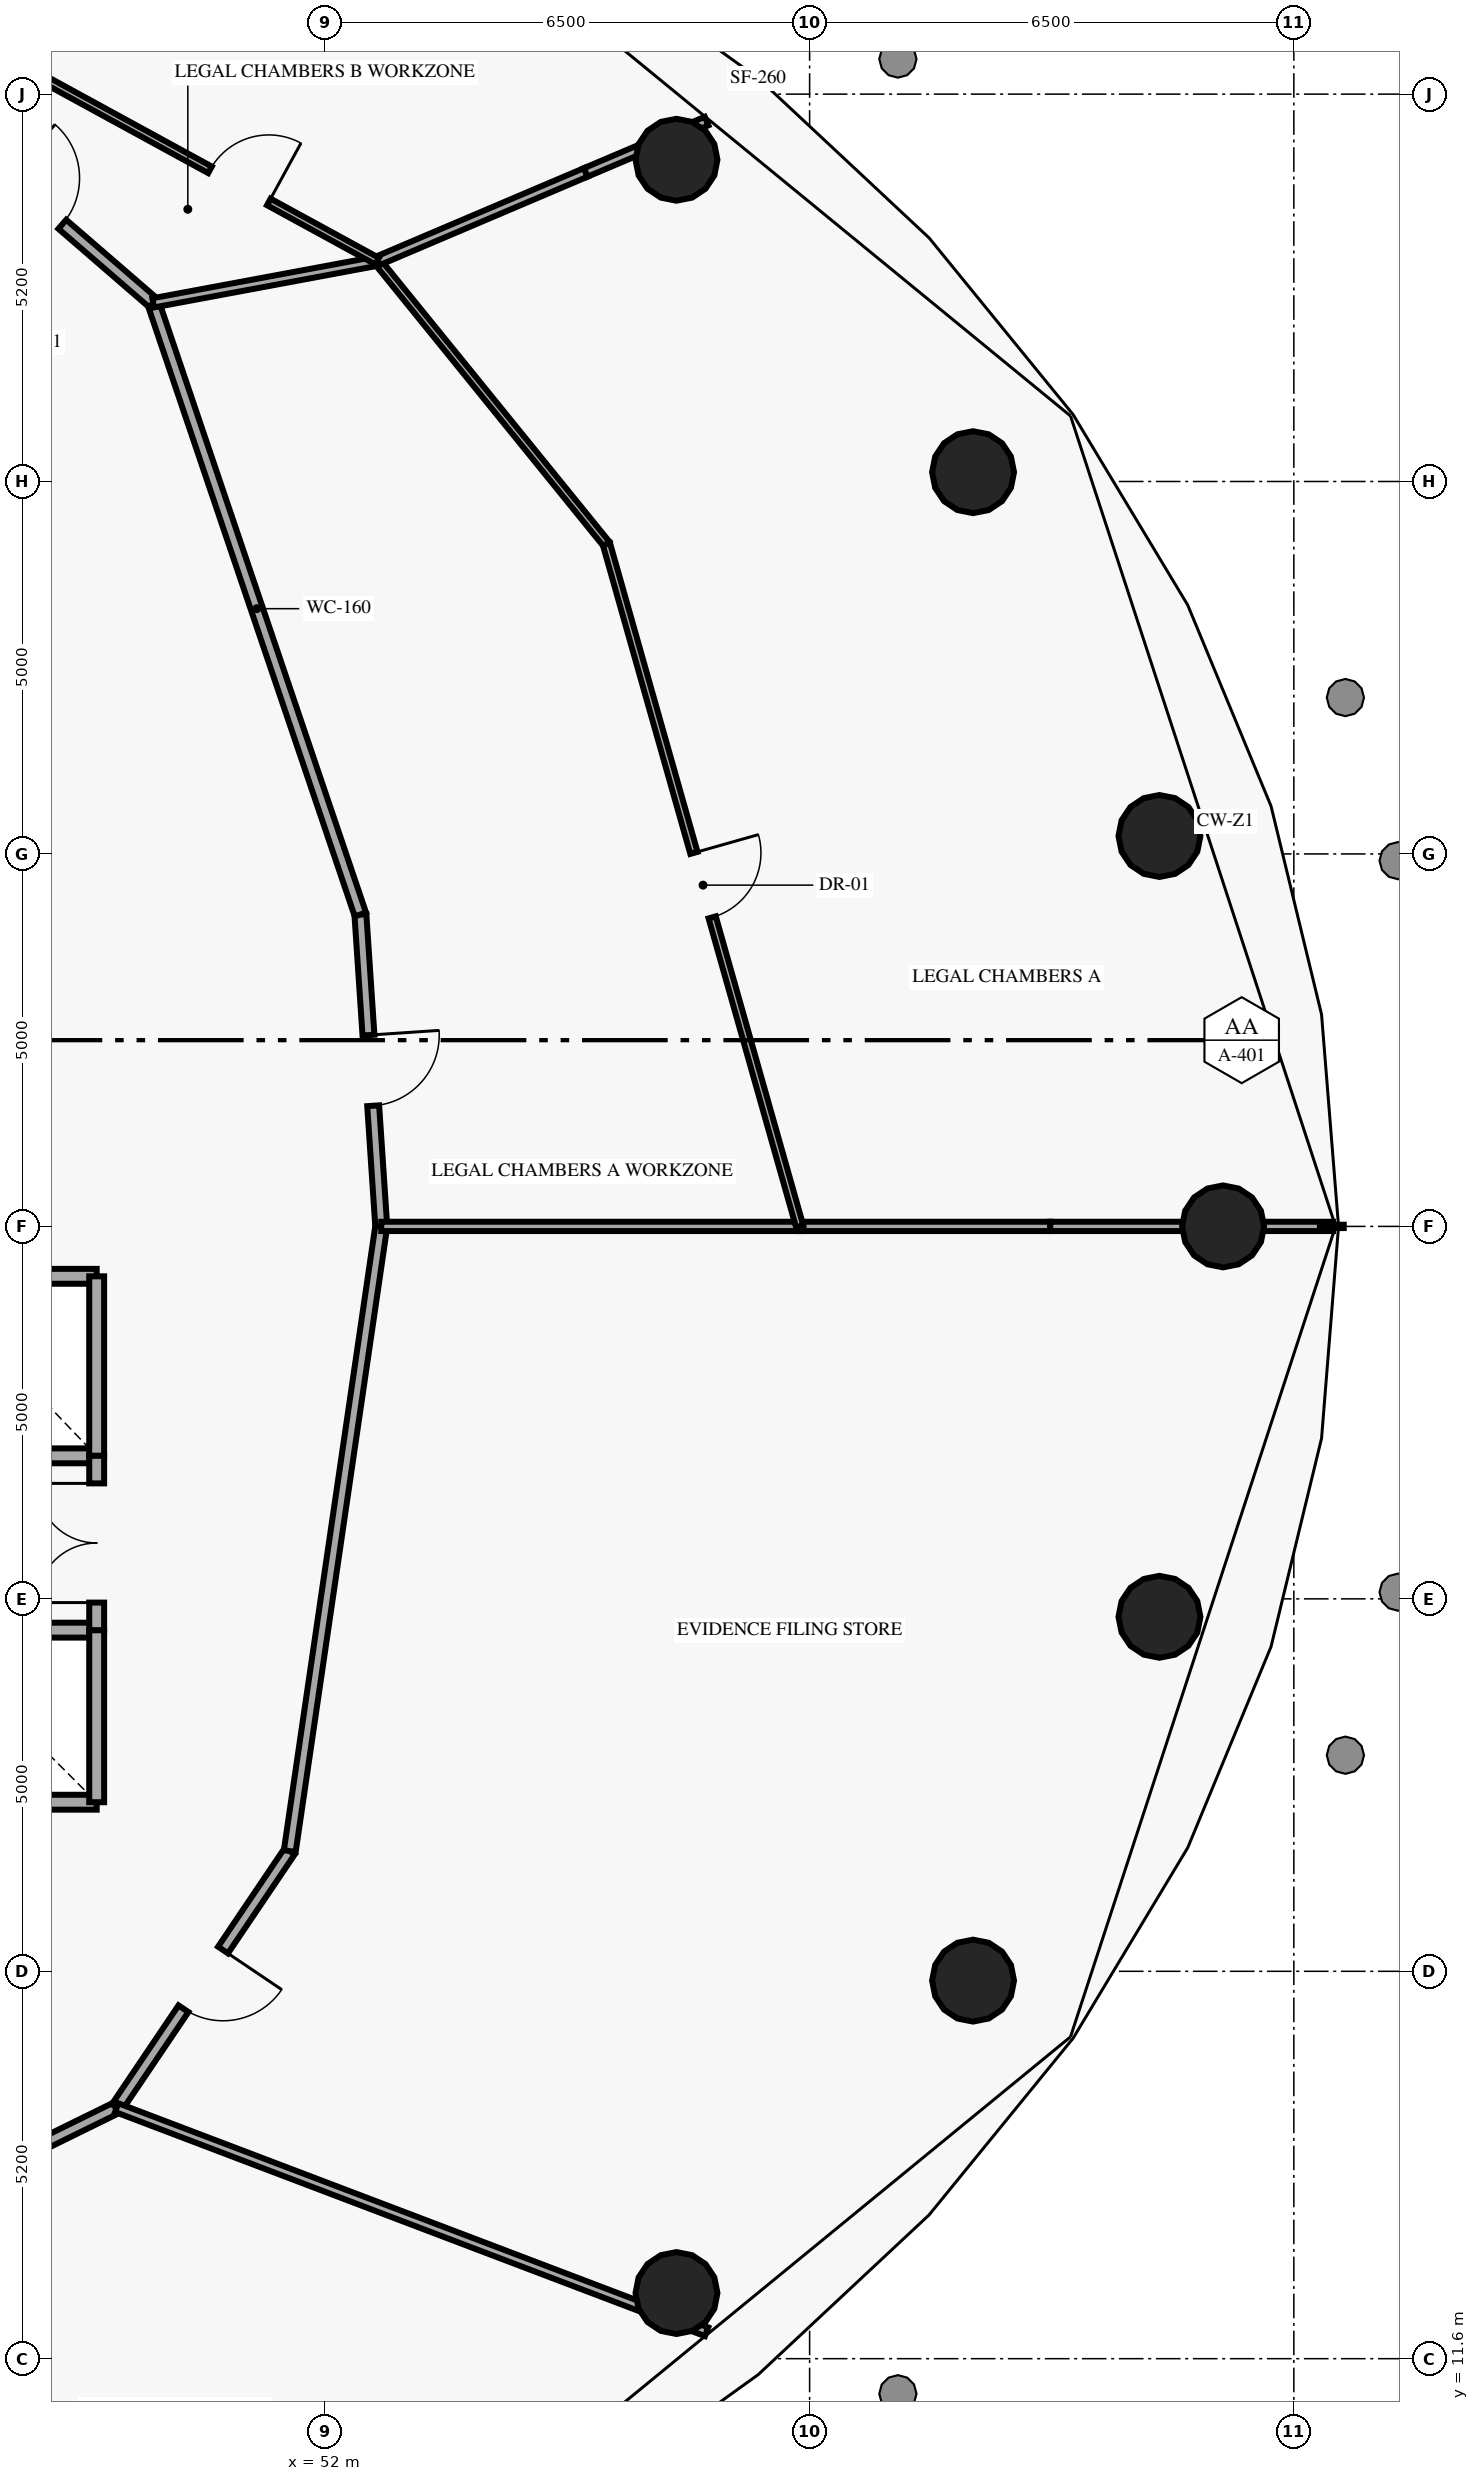
"""IFC4 building model, lengths in metres.
Left out: names, types, materials, properties, quantities, classifications, styles, units other than length and angle.
Written with IfcOpenShell. Run it as: python <this file> out.ifc"""

import sys

from ifc_helpers import new_model, si_unit, direction, frame, frame_2d, origin, origin_2d, place, context, subcontext, project, spatial, rectangle, circle, extrude, element, fill, save


model = new_model("IFC4")
c1 = context("Model", 3, precision=1e-05, world=origin(), true_north=direction((0.0, 1.0)))
c2 = subcontext(c1, "Body", "Model", "MODEL_VIEW")
j1 = project(units=[si_unit("LENGTHUNIT", "METRE"), si_unit("PLANEANGLEUNIT", "RADIAN")], contexts=[c1])
p1 = place(None, origin())
s1 = spatial("IfcSite", under=j1, at=p1, CompositionType="ELEMENT")
p2 = place(p1, origin())
s2 = spatial("IfcBuilding", under=s1, at=p2, CompositionType="ELEMENT")
p3 = place(p2, frame((0.0, 0.0, 53.4)))
s3 = spatial("IfcBuildingStorey", under=s2, at=p3, CompositionType="ELEMENT", Elevation=53.4)
for number, where, z_axis, x_axis in (
    (1, (64.05, 26.8, 0.0), (0.0, 0.0, 1.0), (1.0, 0.0, 0.0)),
    (2, (63.196, 32.041, 0.0), (0.0, 0.0, 1.0), (1.0, 0.0, 0.0)),
    (3, (60.694, 36.925, 0.0), (0.0, 0.0, 1.0), (1.0, 0.0, 0.0)),
    (4, (56.713, 41.119, 0.0), (0.0, 0.0, 1.0), (1.0, 0.0, 0.0)),
    (5, (56.713, 12.481, 0.0), (0.0, 0.0, 1.0), (1.0, 0.0, 0.0)),
    (6, (60.694, 16.675, 0.0), (0.0, 0.0, 1.0), (1.0, 0.0, 0.0)),
    (7, (63.196, 21.559, 0.0), (0.0, 0.0, 1.0), (1.0, 0.0, 0.0)),
):
    element("IfcColumn", number, at=place(p3, frame(where, z_axis=z_axis, x_axis=x_axis)), inside=s3, PredefinedType="COLUMN", context=c2, shape_type="SweptSolid", body=[
        extrude(circle(Radius=0.55, at=origin_2d()), origin(), (0.0, 0.0, 1.0), 3.8),
    ])
for number, where, z_axis, x_axis in (
    (8, (46.62, 23.72, 0.0), (0.0, 0.0, 1.0), (1.0, 0.0, 0.0)),
    (9, (46.62, 26.13, 0.0), (0.0, 0.0, 1.0), (1.0, 0.0, 0.0)),
):
    element("IfcWall", number, at=place(p3, frame(where, z_axis=z_axis, x_axis=x_axis)), inside=s3, PredefinedType="SOLIDWALL", context=c2, shape_type="SweptSolid", body=[
        extrude(rectangle(XDim=2.31, YDim=0.2, at=frame_2d((1.155, 0.0))), origin(), (0.0, 0.0, 1.0), 3.8),
    ])
p4 = place(p3, frame((48.93, 23.72, 0.0), z_axis=(0.0, 0.0, 1.0), x_axis=(0.0, 1.0, 0.0)))
e10 = element("IfcWall", 10, at=p4, inside=s3, PredefinedType="SOLIDWALL", context=c2, shape_type="SweptSolid", body=[
    extrude(rectangle(XDim=2.41, YDim=0.2, at=frame_2d((1.205, 0.0))), origin(), (0.0, 0.0, 1.0), 3.8),
])
for number, where, z_axis, x_axis in (
    (11, (46.62, 19.07, 0.0), (0.0, 0.0, 1.0), (1.0, 0.0, 0.0)),
    (12, (46.62, 21.38, 0.0), (0.0, 0.0, 1.0), (1.0, 0.0, 0.0)),
    (13, (48.93, 19.07, 0.0), (0.0, 0.0, 1.0), (0.0, 1.0, 0.0)),
):
    element("IfcWall", number, at=place(p3, frame(where, z_axis=z_axis, x_axis=x_axis)), inside=s3, PredefinedType="SOLIDWALL", context=c2, shape_type="SweptSolid", body=[
        extrude(rectangle(XDim=2.31, YDim=0.2, at=frame_2d((1.155, 0.0))), origin(), (0.0, 0.0, 1.0), 3.8),
    ])
p5 = place(p3, frame((48.93, 21.38, 0.0), z_axis=(0.0, 0.0, 1.0), x_axis=(0.0, 1.0, 0.0)))
e14 = element("IfcWall", 14, at=p5, inside=s3, PredefinedType="SOLIDWALL", context=c2, shape_type="SweptSolid", body=[
    extrude(rectangle(XDim=2.34, YDim=0.2, at=frame_2d((1.17, 0.0))), origin(), (0.0, 0.0, 1.0), 3.8),
])
p6 = place(p5, frame((0.37, 0.0, 0.0)))
e15 = element("IfcOpeningElement", 15, at=p6, cuts=e14, PredefinedType="OPENING", context=c2, shape_type="SweptSolid", body=[
    extrude(rectangle(XDim=1.6, YDim=2.2, at=frame_2d((0.8, 1.1))), frame((0.0, 0.11, 0.0), z_axis=(0.0, -1.0, 0.0), x_axis=(1.0, 0.0, 0.0)), (0.0, 0.0, 1.0), 0.22),
])
p7 = place(p3, frame((52.47, 30.987, 0.0), z_axis=(0.0, 0.0, 1.0), x_axis=(0.06673138835, -0.997770976632, 0.0)))
e16 = element("IfcWall", 16, at=p7, inside=s3, PredefinedType="PARTITIONING", context=c2, shape_type="SweptSolid", body=[
    extrude(rectangle(XDim=4.196, YDim=0.16, at=frame_2d((2.098, 0.0))), origin(), (0.0, 0.0, 1.0), 3.8),
])
p8 = place(p7, frame((1.623, 0.0, 0.0)))
e17 = element("IfcOpeningElement", 17, at=p8, cuts=e16, PredefinedType="OPENING", context=c2, shape_type="SweptSolid", body=[
    extrude(rectangle(XDim=0.95, YDim=2.15, at=frame_2d((0.475, 1.075))), frame((0.0, 0.09, 0.0), z_axis=(0.0, -1.0, 0.0), x_axis=(1.0, 0.0, 0.0)), (0.0, 0.0, 1.0), 0.18),
])
p9 = place(p3, frame((52.47, 30.987, 0.0), z_axis=(0.0, 0.0, 1.0), x_axis=(-0.320794809252, 0.947148716072, 0.0)))
e18 = element("IfcWall", 18, at=p9, inside=s3, PredefinedType="PARTITIONING", context=c2, shape_type="SweptSolid", body=[
    extrude(rectangle(XDim=8.669, YDim=0.16, at=frame_2d((4.334, 0.0))), origin(), (0.0, 0.0, 1.0), 3.8),
])
p10 = place(p3, frame((46.53, 41.929, 0.0), z_axis=(0.0, 0.0, 1.0), x_axis=(0.756492941082, -0.654001857867, 0.0)))
e19 = element("IfcWall", 19, at=p10, inside=s3, PredefinedType="PARTITIONING", context=c2, shape_type="SweptSolid", body=[
    extrude(rectangle(XDim=4.176, YDim=0.16, at=frame_2d((2.088, 0.0))), origin(), (0.0, 0.0, 1.0), 3.8),
])
p11 = place(p10, frame((1.613, 0.0, 0.0)))
e20 = element("IfcOpeningElement", 20, at=p11, cuts=e19, PredefinedType="OPENING", context=c2, shape_type="SweptSolid", body=[
    extrude(rectangle(XDim=0.95, YDim=2.15, at=frame_2d((0.475, 1.075))), frame((0.0, 0.09, 0.0), z_axis=(0.0, -1.0, 0.0), x_axis=(1.0, 0.0, 0.0)), (0.0, 0.0, 1.0), 0.18),
])
p12 = place(p3, frame((42.494, 11.674, 0.0), z_axis=(0.0, 0.0, 1.0), x_axis=(0.897439047431, 0.441138477291, 0.0)))
e21 = element("IfcWall", 21, at=p12, inside=s3, PredefinedType="PARTITIONING", context=c2, shape_type="SweptSolid", body=[
    extrude(rectangle(XDim=7.471, YDim=0.16, at=frame_2d((3.736, 0.0))), origin(), (0.0, 0.0, 1.0), 3.8),
])
p13 = place(p3, frame((51.522, 18.414, 0.0), z_axis=(0.0, 0.0, 1.0), x_axis=(-0.559181123292, -0.829045518264, 0.0)))
e22 = element("IfcWall", 22, at=p13, inside=s3, PredefinedType="PARTITIONING", context=c2, shape_type="SweptSolid", body=[
    extrude(rectangle(XDim=4.154, YDim=0.16, at=frame_2d((2.077, 0.0))), origin(), (0.0, 0.0, 1.0), 3.8),
])
p14 = place(p13, frame((1.602, 0.0, 0.0)))
e23 = element("IfcOpeningElement", 23, at=p14, cuts=e22, PredefinedType="OPENING", context=c2, shape_type="SweptSolid", body=[
    extrude(rectangle(XDim=0.95, YDim=2.15, at=frame_2d((0.475, 1.075))), frame((0.0, 0.09, 0.0), z_axis=(0.0, -1.0, 0.0), x_axis=(1.0, 0.0, 0.0)), (0.0, 0.0, 1.0), 0.18),
])
p15 = place(p3, frame((51.522, 18.414, 0.0), z_axis=(0.0, 0.0, 1.0), x_axis=(0.14489272673, 0.989447369869, 0.0)))
e24 = element("IfcWall", 24, at=p15, inside=s3, PredefinedType="PARTITIONING", context=c2, shape_type="SweptSolid", body=[
    extrude(rectangle(XDim=8.475, YDim=0.16, at=frame_2d((4.238, 0.0))), origin(), (0.0, 0.0, 1.0), 3.8),
])
p16 = place(p3, frame((52.75, 26.8, 0.0), z_axis=(0.0, 0.0, 1.0), x_axis=(1.0, 0.0, 0.0)))
e25 = element("IfcWall", 25, at=p16, inside=s3, PredefinedType="PARTITIONING", context=c2, shape_type="SweptSolid", body=[
    extrude(rectangle(XDim=5.617, YDim=0.125, at=frame_2d((2.809, 0.0))), origin(), (0.0, 0.0, 1.0), 3.8),
])
p17 = place(p3, frame((58.367, 26.8, 0.0), z_axis=(0.0, 0.0, 1.0), x_axis=(1.0, 0.0, 0.0)))
e26 = element("IfcWall", 26, at=p17, inside=s3, PredefinedType="PARTITIONING", context=c2, shape_type="SweptSolid", body=[
    extrude(rectangle(XDim=3.363, YDim=0.125, at=frame_2d((1.682, 0.0))), origin(), (0.0, 0.0, 1.0), 3.8),
])
p18 = place(p3, frame((61.73, 26.8, 0.0), z_axis=(0.0, 0.0, 1.0), x_axis=(1.0, 0.0, 0.0)))
e27 = element("IfcWall", 27, at=p18, inside=s3, PredefinedType="PARTITIONING", context=c2, shape_type="SweptSolid", body=[
    extrude(rectangle(XDim=2.327, YDim=0.125, at=frame_2d((1.164, 0.0))), origin(), (0.0, 0.0, 1.0), 2.79),
])
p19 = place(p3, frame((64.057, 26.8, 0.0), z_axis=(0.0, 0.0, 1.0), x_axis=(1.0, 0.0, 0.0)))
e28 = element("IfcWall", 28, at=p19, inside=s3, PredefinedType="PARTITIONING", context=c2, shape_type="SweptSolid", body=[
    extrude(rectangle(XDim=1.468, YDim=0.125, at=frame_2d((0.734, 0.0))), origin(), (0.0, 0.0, 1.0), 3.8),
])
p20 = place(p3, frame((55.772, 35.962, 0.0), z_axis=(0.0, 0.0, 1.0), x_axis=(0.272515943622, -0.962151266939, 0.0)))
e29 = element("IfcWall", 29, at=p20, inside=s3, PredefinedType="MOVABLE", context=c2, shape_type="SweptSolid", body=[
    extrude(rectangle(XDim=9.522, YDim=0.1, at=frame_2d((4.761, 0.0))), origin(), (0.0, 0.0, 1.0), 3.8),
])
p21 = place(p20, frame((4.311, 0.0, 0.0)))
e30 = element("IfcOpeningElement", 30, at=p21, cuts=e29, PredefinedType="OPENING", context=c2, shape_type="SweptSolid", body=[
    extrude(rectangle(XDim=0.9, YDim=2.1, at=frame_2d((0.45, 1.05))), frame((0.0, 0.06, 0.0), z_axis=(0.0, -1.0, 0.0), x_axis=(1.0, 0.0, 0.0)), (0.0, 0.0, 1.0), 0.12),
])
p22 = place(p3, frame((55.772, 35.962, 0.0), z_axis=(0.0, 0.0, 1.0), x_axis=(-0.629672409309, 0.776860770637, 0.0)))
e31 = element("IfcWall", 31, at=p22, inside=s3, PredefinedType="MOVABLE", context=c2, shape_type="SweptSolid", body=[
    extrude(rectangle(XDim=4.886, YDim=0.1, at=frame_2d((2.443, 0.0))), origin(), (0.0, 0.0, 1.0), 3.8),
])
p23 = place(p3, frame((49.689, 39.198, 0.0), z_axis=(0.0, 0.0, 1.0), x_axis=(0.983083941647, 0.183155572333, 0.0)))
e32 = element("IfcWall", 32, at=p23, inside=s3, PredefinedType="PARTITIONING", context=c2, shape_type="SweptSolid", body=[
    extrude(rectangle(XDim=3.058, YDim=0.125, at=frame_2d((1.529, 0.0))), origin(), (0.0, 0.0, 1.0), 3.02),
])
p24 = place(p3, frame((52.695, 39.758, 0.0), z_axis=(0.0, 0.0, 1.0), x_axis=(0.92022473881, 0.391390380671, 0.0)))
e33 = element("IfcWall", 33, at=p24, inside=s3, PredefinedType="PARTITIONING", context=c2, shape_type="SweptSolid", body=[
    extrude(rectangle(XDim=3.043, YDim=0.125, at=frame_2d((1.521, 0.0))), origin(), (0.0, 0.0, 1.0), 3.02),
])
p25 = place(p3, frame((55.495, 40.949, 0.0), z_axis=(0.0, 0.0, 1.0), x_axis=(0.920394497478, 0.390991008864, 0.0)))
e34 = element("IfcWall", 34, at=p25, inside=s3, PredefinedType="PARTITIONING", context=c2, shape_type="SweptSolid", body=[
    extrude(rectangle(XDim=1.762, YDim=0.125, at=frame_2d((0.881, 0.0))), origin(), (0.0, 0.0, 1.0), 3.8),
])
p26 = place(p3, frame((44.013, 44.501, 0.0), z_axis=(0.0, 0.0, 1.0), x_axis=(0.877588886427, -0.479413961437, 0.0)))
e35 = element("IfcWall", 35, at=p26, inside=s3, PredefinedType="MOVABLE", context=c2, shape_type="SweptSolid", body=[
    extrude(rectangle(XDim=9.893, YDim=0.1, at=frame_2d((4.947, 0.0))), origin(), (0.0, 0.0, 1.0), 3.8),
])
p27 = place(p26, frame((7.336, 0.0, 0.0)))
e36 = element("IfcOpeningElement", 36, at=p27, cuts=e35, PredefinedType="OPENING", context=c2, shape_type="SweptSolid", body=[
    extrude(rectangle(XDim=0.9, YDim=2.1, at=frame_2d((0.45, 1.05))), frame((0.0, 0.06, 0.0), z_axis=(0.0, -1.0, 0.0), x_axis=(1.0, 0.0, 0.0)), (0.0, 0.0, 1.0), 0.12),
])
p28 = place(p3, frame((49.199, 14.97, 0.0), z_axis=(0.0, 0.0, 1.0), x_axis=(0.934775541041, -0.355238916605, 0.0)))
e37 = element("IfcWall", 37, at=p28, inside=s3, PredefinedType="PARTITIONING", context=c2, shape_type="SweptSolid", body=[
    extrude(rectangle(XDim=8.47, YDim=0.125, at=frame_2d((4.235, 0.0))), origin(), (0.0, 0.0, 1.0), 3.8),
])
p29 = place(p6, origin())
e38 = element("IfcDoor", 38, at=p29, inside=s3, OperationType="DOUBLE_DOOR_SINGLE_SWING", PredefinedType="DOOR", context=c2, shape_type="SweptSolid", body=[
    extrude(rectangle(XDim=1.6, YDim=2.2, at=frame_2d((0.8, 1.1))), frame((0.0, 0.025, 0.0), z_axis=(0.0, -1.0, 0.0), x_axis=(1.0, 0.0, 0.0)), (0.0, 0.0, 1.0), 0.05),
])
fill(e15, e38)
p30 = place(p8, origin())
e39 = element("IfcDoor", 39, at=p30, inside=s3, OperationType="SINGLE_SWING_LEFT", PredefinedType="DOOR", context=c2, shape_type="SweptSolid", body=[
    extrude(rectangle(XDim=0.95, YDim=2.15, at=frame_2d((0.475, 1.075))), frame((0.0, 0.025, 0.0), z_axis=(0.0, -1.0, 0.0), x_axis=(1.0, 0.0, 0.0)), (0.0, 0.0, 1.0), 0.05),
])
fill(e17, e39)
p31 = place(p11, origin())
e40 = element("IfcDoor", 40, at=p31, inside=s3, OperationType="SINGLE_SWING_LEFT", PredefinedType="DOOR", context=c2, shape_type="SweptSolid", body=[
    extrude(rectangle(XDim=0.95, YDim=2.15, at=frame_2d((0.475, 1.075))), frame((0.0, 0.025, 0.0), z_axis=(0.0, -1.0, 0.0), x_axis=(1.0, 0.0, 0.0)), (0.0, 0.0, 1.0), 0.05),
])
fill(e20, e40)
p32 = place(p14, origin())
e41 = element("IfcDoor", 41, at=p32, inside=s3, OperationType="SINGLE_SWING_LEFT", PredefinedType="DOOR", context=c2, shape_type="SweptSolid", body=[
    extrude(rectangle(XDim=0.95, YDim=2.15, at=frame_2d((0.475, 1.075))), frame((0.0, 0.025, 0.0), z_axis=(0.0, -1.0, 0.0), x_axis=(1.0, 0.0, 0.0)), (0.0, 0.0, 1.0), 0.05),
])
fill(e23, e41)
p33 = place(p21, origin())
e42 = element("IfcDoor", 42, at=p33, inside=s3, OperationType="SINGLE_SWING_LEFT", PredefinedType="DOOR", context=c2, shape_type="SweptSolid", body=[
    extrude(rectangle(XDim=0.9, YDim=2.1, at=frame_2d((0.45, 1.05))), frame((0.0, 0.025, 0.0), z_axis=(0.0, -1.0, 0.0), x_axis=(1.0, 0.0, 0.0)), (0.0, 0.0, 1.0), 0.05),
])
fill(e30, e42)
p34 = place(p27, origin())
e43 = element("IfcDoor", 43, at=p34, inside=s3, OperationType="SINGLE_SWING_RIGHT", PredefinedType="DOOR", context=c2, shape_type="SweptSolid", body=[
    extrude(rectangle(XDim=0.9, YDim=2.1, at=frame_2d((0.45, 1.05))), frame((0.0, 0.025, 0.0), z_axis=(0.0, -1.0, 0.0), x_axis=(1.0, 0.0, 0.0)), (0.0, 0.0, 1.0), 0.05),
])
fill(e36, e43)
save(model, sys.argv[1])
